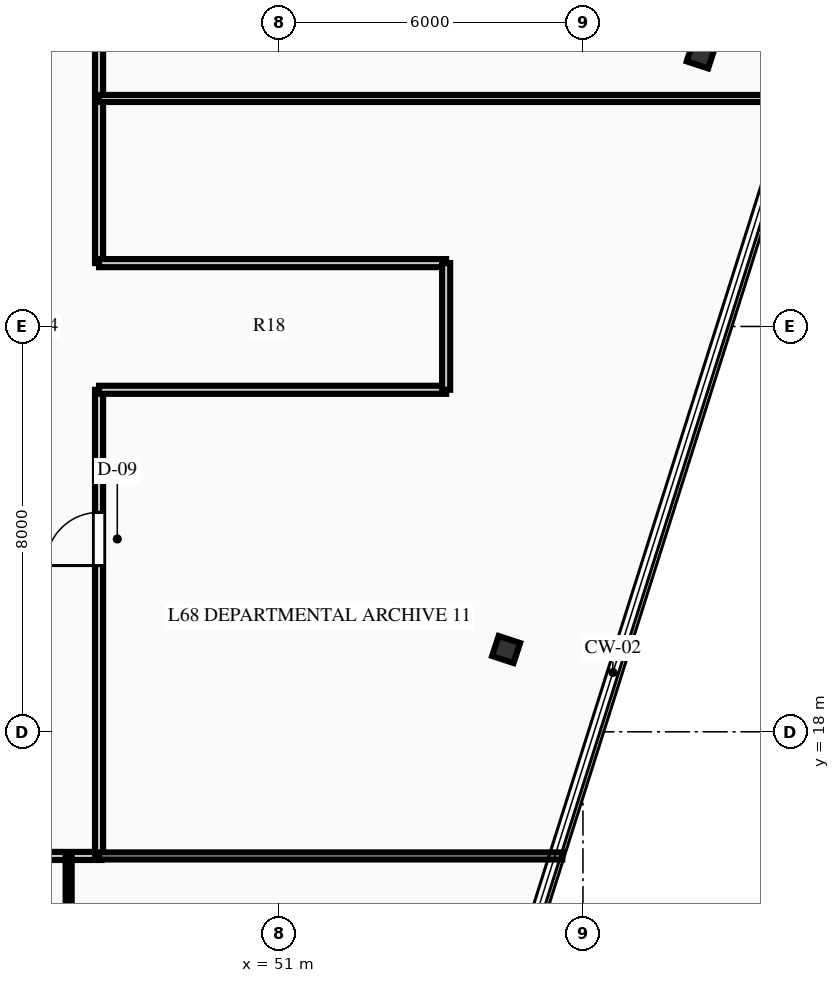
"""IFC4 building model, lengths in metres.
Left out: names, types, materials, properties, quantities, classifications, styles, units other than length and angle.
Written with IfcOpenShell. Run it as: python <this file> out.ifc"""

import sys

from ifc_helpers import new_model, si_unit, direction, frame, frame_2d, origin, origin_2d, place, context, subcontext, project, spatial, rectangle, i_section, extrude, element, fill, save


model = new_model("IFC4")
c1 = context("Model", 3, precision=1e-05, world=origin(), true_north=direction((0.0, 1.0)))
c2 = subcontext(c1, "Body", "Model", "MODEL_VIEW")
j1 = project(units=[si_unit("LENGTHUNIT", "METRE"), si_unit("PLANEANGLEUNIT", "RADIAN")], contexts=[c1])
p1 = place(None, origin())
s1 = spatial("IfcSite", under=j1, at=p1, CompositionType="ELEMENT")
p2 = place(p1, origin())
s2 = spatial("IfcBuilding", under=s1, at=p2, CompositionType="ELEMENT")
p3 = place(p2, frame((0.0, 0.0, 271.2)))
s3 = spatial("IfcBuildingStorey", under=s2, at=p3, CompositionType="ELEMENT", Elevation=271.2)
for number, where, z_axis, x_axis in (
    (1, (55.483, 19.624, 0.0), (0.0, 0.0, 1.0), (0.311, 0.95, 0.0)),
    (2, (59.324, 31.36, 0.0), (0.0, 0.0, 1.0), (0.311, 0.95, 0.0)),
):
    element("IfcColumn", number, at=place(p3, frame(where, z_axis=z_axis, x_axis=x_axis)), inside=s3, PredefinedType="COLUMN", context=c2, shape_type="SweptSolid", body=[
        extrude(i_section(OverallWidth=0.416, OverallDepth=0.445, WebThickness=0.039, FlangeThickness=0.063, at=origin_2d()), origin(), (0.0, 0.0, 1.0), 3.75),
    ])
p4 = place(p3, frame((37.25, 15.55, 0.0), z_axis=(0.0, 0.0, 1.0), x_axis=(1.0, 0.0, 0.0)))
e3 = element("IfcWall", 3, at=p4, inside=s3, PredefinedType="PARTITIONING", context=c2, shape_type="SweptSolid", body=[
    extrude(rectangle(XDim=10.25, YDim=0.16, at=frame_2d((5.125, 0.0))), origin(), (0.0, 0.0, 1.0), 3.48),
])
p5 = place(p4, frame((3.4, 0.0, 0.0)))
e4 = element("IfcOpeningElement", 4, at=p5, cuts=e3, PredefinedType="OPENING", context=c2, shape_type="SweptSolid", body=[
    extrude(rectangle(XDim=0.9, YDim=2.15, at=frame_2d((0.45, 1.075))), frame((0.0, 0.09, 0.0), z_axis=(0.0, -1.0, 0.0), x_axis=(1.0, 0.0, 0.0)), (0.0, 0.0, 1.0), 0.18),
])
p6 = place(p4, frame((5.7, 0.0, 0.0)))
e5 = element("IfcOpeningElement", 5, at=p6, cuts=e3, PredefinedType="OPENING", context=c2, shape_type="SweptSolid", body=[
    extrude(rectangle(XDim=0.9, YDim=2.15, at=frame_2d((0.45, 1.075))), frame((0.0, 0.09, 0.0), z_axis=(0.0, -1.0, 0.0), x_axis=(1.0, 0.0, 0.0)), (0.0, 0.0, 1.0), 0.18),
])
p7 = place(p4, frame((7.95, 0.0, 0.0)))
e6 = element("IfcOpeningElement", 6, at=p7, cuts=e3, PredefinedType="OPENING", context=c2, shape_type="SweptSolid", body=[
    extrude(rectangle(XDim=1.0, YDim=2.15, at=frame_2d((0.5, 1.075))), frame((0.0, 0.09, 0.0), z_axis=(0.0, -1.0, 0.0), x_axis=(1.0, 0.0, 0.0)), (0.0, 0.0, 1.0), 0.18),
])
p8 = place(p3, frame((47.45, 15.55, 0.0), z_axis=(0.0, 0.0, 1.0), x_axis=(0.0, 1.0, 0.0)))
e7 = element("IfcWall", 7, at=p8, inside=s3, PredefinedType="PARTITIONING", context=c2, shape_type="SweptSolid", body=[
    extrude(rectangle(XDim=9.2, YDim=0.16, at=frame_2d((4.6, 0.0))), origin(), (0.0, 0.0, 1.0), 3.48),
])
p9 = place(p8, frame((5.731, 0.0, 0.0)))
e8 = element("IfcOpeningElement", 8, at=p9, cuts=e7, PredefinedType="OPENING", context=c2, shape_type="SweptSolid", body=[
    extrude(rectangle(XDim=1.05, YDim=2.15, at=frame_2d((0.525, 1.075))), frame((0.0, 0.09, 0.0), z_axis=(0.0, -1.0, 0.0), x_axis=(1.0, 0.0, 0.0)), (0.0, 0.0, 1.0), 0.18),
])
p10 = place(p3, frame((47.45, 27.25, 0.0), z_axis=(0.0, 0.0, 1.0), x_axis=(0.0, 1.0, 0.0)))
e9 = element("IfcWall", 9, at=p10, inside=s3, PredefinedType="PARTITIONING", context=c2, shape_type="SweptSolid", body=[
    extrude(rectangle(XDim=9.2, YDim=0.16, at=frame_2d((4.6, 0.0))), origin(), (0.0, 0.0, 1.0), 3.48),
])
p11 = place(p10, frame((4.403, 0.0, 0.0)))
e10 = element("IfcOpeningElement", 10, at=p11, cuts=e9, PredefinedType="OPENING", context=c2, shape_type="SweptSolid", body=[
    extrude(rectangle(XDim=1.05, YDim=2.15, at=frame_2d((0.525, 1.075))), frame((0.0, 0.09, 0.0), z_axis=(0.0, -1.0, 0.0), x_axis=(1.0, 0.0, 0.0)), (0.0, 0.0, 1.0), 0.18),
])
for number, where, z_axis, x_axis in (
    (11, (47.45, 24.75, 0.0), (0.0, 0.0, 1.0), (1.0, 0.0, 0.0)),
    (12, (47.45, 27.25, 0.0), (0.0, 0.0, 1.0), (1.0, 0.0, 0.0)),
):
    element("IfcWall", number, at=place(p3, frame(where, z_axis=z_axis, x_axis=x_axis)), inside=s3, PredefinedType="PARTITIONING", context=c2, shape_type="SweptSolid", body=[
        extrude(rectangle(XDim=6.85, YDim=0.16, at=frame_2d((3.425, 0.0))), origin(), (0.0, 0.0, 1.0), 3.48),
    ])
p12 = place(p3, frame((54.3, 24.75, 0.0), z_axis=(0.0, 0.0, 1.0), x_axis=(0.0, 1.0, 0.0)))
e13 = element("IfcWall", 13, at=p12, inside=s3, PredefinedType="PARTITIONING", context=c2, shape_type="SweptSolid", body=[
    extrude(rectangle(XDim=2.5, YDim=0.16, at=frame_2d((1.25, 0.0))), origin(), (0.0, 0.0, 1.0), 3.48),
])
p13 = place(p3, frame((46.85, 11.65, 0.0), z_axis=(0.0, 0.0, 1.0), x_axis=(0.0, 1.0, 0.0)))
e14 = element("IfcWall", 14, at=p13, inside=s3, PredefinedType="PARTITIONING", context=c2, shape_type="SweptSolid", body=[
    extrude(rectangle(XDim=3.9, YDim=0.12, at=frame_2d((1.95, 0.0))), origin(), (0.0, 0.0, 1.0), 3.48),
])
p14 = place(p3, frame((47.45, 15.55, 0.0), z_axis=(0.0, 0.0, 1.0), x_axis=(1.0, 0.0, 0.0)))
e15 = element("IfcWall", 15, at=p14, inside=s3, PredefinedType="PARTITIONING", context=c2, shape_type="SweptSolid", body=[
    extrude(rectangle(XDim=9.142, YDim=0.14, at=frame_2d((4.571, 0.0))), origin(), (0.0, 0.0, 1.0), 3.48),
])
p15 = place(p3, frame((47.45, 30.5, 0.0), z_axis=(0.0, 0.0, 1.0), x_axis=(1.0, 0.0, 0.0)))
e16 = element("IfcWall", 16, at=p15, inside=s3, PredefinedType="PARTITIONING", context=c2, shape_type="SweptSolid", body=[
    extrude(rectangle(XDim=13.871, YDim=0.14, at=frame_2d((6.935, 0.0))), origin(), (0.0, 0.0, 1.0), 3.48),
])
p16 = place(p9, origin())
e17 = element("IfcDoor", 17, at=p16, inside=s3, OperationType="SINGLE_SWING_LEFT", PredefinedType="DOOR", context=c2, shape_type="SweptSolid", body=[
    extrude(rectangle(XDim=1.05, YDim=2.15, at=frame_2d((0.525, 1.075))), frame((0.0, 0.025, 0.0), z_axis=(0.0, -1.0, 0.0), x_axis=(1.0, 0.0, 0.0)), (0.0, 0.0, 1.0), 0.05),
])
fill(e8, e17)
save(model, sys.argv[1])
